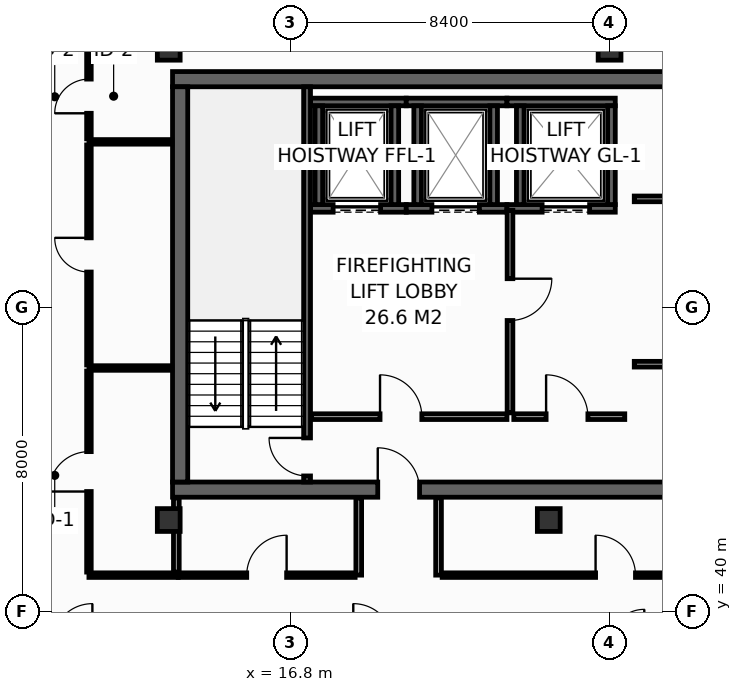
"""IFC4 building model, lengths in metres.
Left out: names, types, materials, properties, quantities, classifications, styles, units other than length and angle.
Written with IfcOpenShell. Run it as: python <this file> out.ifc"""

import sys

from ifc_helpers import new_model, si_unit, direction, frame, frame_2d, origin, origin_2d, place, context, subcontext, project, spatial, rectangle, hollow_rectangle, extrude, element, fill, save


model = new_model("IFC4")
c1 = context("Model", 3, precision=1e-05, world=origin(), true_north=direction((0.0, 1.0)))
c2 = subcontext(c1, "Body", "Model", "MODEL_VIEW")
j1 = project(units=[si_unit("LENGTHUNIT", "METRE"), si_unit("PLANEANGLEUNIT", "RADIAN")], contexts=[c1])
p1 = place(None, origin())
s1 = spatial("IfcSite", under=j1, at=p1, CompositionType="ELEMENT")
p2 = place(p1, origin())
s2 = spatial("IfcBuilding", under=s1, at=p2, CompositionType="ELEMENT")
p3 = place(p2, frame((0.0, 0.0, 283.8)))
s3 = spatial("IfcBuildingStorey", under=s2, at=p3, CompositionType="ELEMENT", Elevation=283.8)
p4 = place(p3, frame((13.7, 43.2, 0.0), z_axis=(0.0, 0.0, 1.0), x_axis=(1.0, 0.0, 0.0)))
e1 = element("IfcWall", 1, at=p4, inside=s3, PredefinedType="SHEAR", context=c2, shape_type="SweptSolid", body=[
    extrude(rectangle(XDim=32.5, YDim=0.4, at=frame_2d((16.25, 0.0))), origin(), (0.0, 0.0, 1.0), 3.55),
])
p5 = place(p4, frame((5.4, 0.0, 0.0)))
e2 = element("IfcOpeningElement", 2, at=p5, cuts=e1, PredefinedType="OPENING", context=c2, shape_type="SweptSolid", body=[
    extrude(rectangle(XDim=1.1, YDim=2.15, at=frame_2d((0.55, 1.075))), frame((0.0, 0.21, 0.0), z_axis=(0.0, -1.0, 0.0), x_axis=(1.0, 0.0, 0.0)), (0.0, 0.0, 1.0), 0.42),
])
p6 = place(p4, frame((25.6, 0.0, 0.0)))
e3 = element("IfcOpeningElement", 3, at=p6, cuts=e1, PredefinedType="OPENING", context=c2, shape_type="SweptSolid", body=[
    extrude(rectangle(XDim=1.1, YDim=2.15, at=frame_2d((0.55, 1.075))), frame((0.0, 0.21, 0.0), z_axis=(0.0, -1.0, 0.0), x_axis=(1.0, 0.0, 0.0)), (0.0, 0.0, 1.0), 0.42),
])
p7 = place(p3, frame((13.7, 54.0, 0.0), z_axis=(0.0, 0.0, 1.0), x_axis=(1.0, 0.0, 0.0)))
e4 = element("IfcWall", 4, at=p7, inside=s3, PredefinedType="SHEAR", context=c2, shape_type="SweptSolid", body=[
    extrude(rectangle(XDim=32.5, YDim=0.4, at=frame_2d((16.25, 0.0))), origin(), (0.0, 0.0, 1.0), 3.55),
])
p8 = place(p3, frame((13.9, 43.4, 0.0), z_axis=(0.0, 0.0, 1.0), x_axis=(0.0, 1.0, 0.0)))
e5 = element("IfcWall", 5, at=p8, inside=s3, PredefinedType="SHEAR", context=c2, shape_type="SweptSolid", body=[
    extrude(rectangle(XDim=10.4, YDim=0.4, at=frame_2d((5.2, 0.0))), origin(), (0.0, 0.0, 1.0), 3.55),
])
for number, where, z_axis, x_axis in (
    (6, (13.6, 54.8, 0.0), (0.0, 0.0, 1.0), (1.0, 0.0, 0.0)),
    (7, (25.2, 54.8, 0.0), (0.0, 0.0, 1.0), (1.0, 0.0, 0.0)),
    (8, (13.6, 42.4, 0.0), (0.0, 0.0, 1.0), (1.0, 0.0, 0.0)),
    (9, (23.6, 42.4, 0.0), (0.0, 0.0, 1.0), (1.0, 0.0, 0.0)),
):
    element("IfcColumn", number, at=place(p3, frame(where, z_axis=z_axis, x_axis=x_axis)), inside=s3, PredefinedType="COLUMN", context=c2, shape_type="SweptSolid", body=[
        extrude(hollow_rectangle(XDim=0.6, YDim=0.6, WallThickness=0.028, at=origin_2d()), origin(), (0.0, 0.0, 1.0), 3.8),
    ])
p9 = place(p3, frame((17.33, 50.6, 0.0), z_axis=(0.0, 0.0, 1.0), x_axis=(1.0, 0.0, 0.0)))
e10 = element("IfcWall", 10, at=p9, inside=s3, PredefinedType="SHEAR", context=c2, shape_type="SweptSolid", body=[
    extrude(rectangle(XDim=2.52, YDim=0.2, at=frame_2d((1.26, 0.0))), origin(), (0.0, 0.0, 1.0), 3.55),
])
p10 = place(p9, frame((0.595, 0.0, 0.0)))
e11 = element("IfcOpeningElement", 11, at=p10, cuts=e10, PredefinedType="OPENING", context=c2, shape_type="SweptSolid", body=[
    extrude(rectangle(XDim=1.25, YDim=2.3, at=frame_2d((0.625, 1.15))), frame((0.0, 0.11, 0.0), z_axis=(0.0, -1.0, 0.0), x_axis=(1.0, 0.0, 0.0)), (0.0, 0.0, 1.0), 0.22),
])
p11 = place(p3, frame((17.33, 53.4, 0.0), z_axis=(0.0, 0.0, 1.0), x_axis=(1.0, 0.0, 0.0)))
e12 = element("IfcWall", 12, at=p11, inside=s3, PredefinedType="SHEAR", context=c2, shape_type="SweptSolid", body=[
    extrude(rectangle(XDim=2.52, YDim=0.2, at=frame_2d((1.26, 0.0))), origin(), (0.0, 0.0, 1.0), 3.55),
])
for number, where, z_axis, x_axis in (
    (13, (17.55, 50.7, 0.0), (0.0, 0.0, 1.0), (0.0, 1.0, 0.0)),
    (14, (19.55, 50.7, 0.0), (0.0, 0.0, 1.0), (0.0, 1.0, 0.0)),
):
    element("IfcWall", number, at=place(p3, frame(where, z_axis=z_axis, x_axis=x_axis)), inside=s3, PredefinedType="SHEAR", context=c2, shape_type="SweptSolid", body=[
        extrude(rectangle(XDim=2.6, YDim=0.2, at=frame_2d((1.3, 0.0))), origin(), (0.0, 0.0, 1.0), 3.55),
    ])
p12 = place(p3, frame((19.85, 50.6, 0.0), z_axis=(0.0, 0.0, 1.0), x_axis=(1.0, 0.0, 0.0)))
e15 = element("IfcWall", 15, at=p12, inside=s3, PredefinedType="SHEAR", context=c2, shape_type="SweptSolid", body=[
    extrude(rectangle(XDim=2.65, YDim=0.2, at=frame_2d((1.325, 0.0))), origin(), (0.0, 0.0, 1.0), 3.55),
])
p13 = place(p12, frame((0.675, 0.0, 0.0)))
e16 = element("IfcOpeningElement", 16, at=p13, cuts=e15, PredefinedType="OPENING", context=c2, shape_type="SweptSolid", body=[
    extrude(rectangle(XDim=1.25, YDim=2.3, at=frame_2d((0.625, 1.15))), frame((0.0, 0.11, 0.0), z_axis=(0.0, -1.0, 0.0), x_axis=(1.0, 0.0, 0.0)), (0.0, 0.0, 1.0), 0.22),
])
p14 = place(p3, frame((19.85, 53.4, 0.0), z_axis=(0.0, 0.0, 1.0), x_axis=(1.0, 0.0, 0.0)))
e17 = element("IfcWall", 17, at=p14, inside=s3, PredefinedType="SHEAR", context=c2, shape_type="SweptSolid", body=[
    extrude(rectangle(XDim=2.65, YDim=0.2, at=frame_2d((1.325, 0.0))), origin(), (0.0, 0.0, 1.0), 3.55),
])
for number, where, z_axis, x_axis in (
    (18, (20.15, 50.7, 0.0), (0.0, 0.0, 1.0), (0.0, 1.0, 0.0)),
    (19, (22.15, 50.7, 0.0), (0.0, 0.0, 1.0), (0.0, 1.0, 0.0)),
):
    element("IfcWall", number, at=place(p3, frame(where, z_axis=z_axis, x_axis=x_axis)), inside=s3, PredefinedType="SHEAR", context=c2, shape_type="SweptSolid", body=[
        extrude(rectangle(XDim=2.6, YDim=0.2, at=frame_2d((1.3, 0.0))), origin(), (0.0, 0.0, 1.0), 3.55),
    ])
p15 = place(p3, frame((22.5, 50.6, 0.0), z_axis=(0.0, 0.0, 1.0), x_axis=(1.0, 0.0, 0.0)))
e20 = element("IfcWall", 20, at=p15, inside=s3, PredefinedType="SHEAR", context=c2, shape_type="SweptSolid", body=[
    extrude(rectangle(XDim=2.85, YDim=0.2, at=frame_2d((1.425, 0.0))), origin(), (0.0, 0.0, 1.0), 3.55),
])
p16 = place(p15, frame((0.925, 0.0, 0.0)))
e21 = element("IfcOpeningElement", 21, at=p16, cuts=e20, PredefinedType="OPENING", context=c2, shape_type="SweptSolid", body=[
    extrude(rectangle(XDim=1.25, YDim=2.3, at=frame_2d((0.625, 1.15))), frame((0.0, 0.11, 0.0), z_axis=(0.0, -1.0, 0.0), x_axis=(1.0, 0.0, 0.0)), (0.0, 0.0, 1.0), 0.22),
])
p17 = place(p3, frame((22.5, 53.4, 0.0), z_axis=(0.0, 0.0, 1.0), x_axis=(1.0, 0.0, 0.0)))
e22 = element("IfcWall", 22, at=p17, inside=s3, PredefinedType="SHEAR", context=c2, shape_type="SweptSolid", body=[
    extrude(rectangle(XDim=2.85, YDim=0.2, at=frame_2d((1.425, 0.0))), origin(), (0.0, 0.0, 1.0), 3.55),
])
for number, where, z_axis, x_axis in (
    (23, (22.85, 50.7, 0.0), (0.0, 0.0, 1.0), (0.0, 1.0, 0.0)),
    (24, (25.25, 50.7, 0.0), (0.0, 0.0, 1.0), (0.0, 1.0, 0.0)),
):
    element("IfcWall", number, at=place(p3, frame(where, z_axis=z_axis, x_axis=x_axis)), inside=s3, PredefinedType="SHEAR", context=c2, shape_type="SweptSolid", body=[
        extrude(rectangle(XDim=2.6, YDim=0.2, at=frame_2d((1.3, 0.0))), origin(), (0.0, 0.0, 1.0), 3.55),
    ])
p18 = place(p3, frame((17.24, 43.4, 0.0), z_axis=(0.0, 0.0, 1.0), x_axis=(0.0, 1.0, 0.0)))
e25 = element("IfcWall", 25, at=p18, inside=s3, PredefinedType="SHEAR", context=c2, shape_type="SweptSolid", body=[
    extrude(rectangle(XDim=10.4, YDim=0.18, at=frame_2d((5.2, 0.0))), origin(), (0.0, 0.0, 1.0), 3.55),
])
p19 = place(p18, frame((0.16, 0.0, 0.0)))
e26 = element("IfcOpeningElement", 26, at=p19, cuts=e25, PredefinedType="OPENING", context=c2, shape_type="SweptSolid", body=[
    extrude(rectangle(XDim=1.0, YDim=2.15, at=frame_2d((0.5, 1.075))), frame((0.0, 0.1, 0.0), z_axis=(0.0, -1.0, 0.0), x_axis=(1.0, 0.0, 0.0)), (0.0, 0.0, 1.0), 0.2),
])
p20 = place(p3, frame((17.36, 45.12, 0.0), z_axis=(0.0, 0.0, 1.0), x_axis=(1.0, 0.0, 0.0)))
e27 = element("IfcWall", 27, at=p20, inside=s3, PredefinedType="PARTITIONING", context=c2, shape_type="SweptSolid", body=[
    extrude(rectangle(XDim=5.14, YDim=0.15, at=frame_2d((2.57, 0.0))), origin(), (0.0, 0.0, 1.0), 3.55),
])
p21 = place(p20, frame((1.8, 0.0, 0.0)))
e28 = element("IfcOpeningElement", 28, at=p21, cuts=e27, PredefinedType="OPENING", context=c2, shape_type="SweptSolid", body=[
    extrude(rectangle(XDim=1.1, YDim=2.15, at=frame_2d((0.55, 1.075))), frame((0.0, 0.085, 0.0), z_axis=(0.0, -1.0, 0.0), x_axis=(1.0, 0.0, 0.0)), (0.0, 0.0, 1.0), 0.17),
])
p22 = place(p3, frame((22.58, 50.55, 0.0), z_axis=(0.0, 0.0, 1.0), x_axis=(0.0, -1.0, 0.0)))
e29 = element("IfcWall", 29, at=p22, inside=s3, PredefinedType="PARTITIONING", context=c2, shape_type="SweptSolid", body=[
    extrude(rectangle(XDim=5.33, YDim=0.15, at=frame_2d((2.665, 0.0))), origin(), (0.0, 0.0, 1.0), 3.55),
])
p23 = place(p22, frame((1.8, 0.0, 0.0)))
e30 = element("IfcOpeningElement", 30, at=p23, cuts=e29, PredefinedType="OPENING", context=c2, shape_type="SweptSolid", body=[
    extrude(rectangle(XDim=1.1, YDim=2.15, at=frame_2d((0.55, 1.075))), frame((0.0, 0.085, 0.0), z_axis=(0.0, -1.0, 0.0), x_axis=(1.0, 0.0, 0.0)), (0.0, 0.0, 1.0), 0.17),
])
p24 = place(p3, frame((22.68, 45.12, 0.0), z_axis=(0.0, 0.0, 1.0), x_axis=(1.0, 0.0, 0.0)))
e31 = element("IfcWall", 31, at=p24, inside=s3, PredefinedType="PARTITIONING", context=c2, shape_type="SweptSolid", body=[
    extrude(rectangle(XDim=2.92, YDim=0.15, at=frame_2d((1.46, 0.0))), origin(), (0.0, 0.0, 1.0), 3.55),
])
p25 = place(p24, frame((0.85, 0.0, 0.0)))
e32 = element("IfcOpeningElement", 32, at=p25, cuts=e31, PredefinedType="OPENING", context=c2, shape_type="SweptSolid", body=[
    extrude(rectangle(XDim=1.1, YDim=2.15, at=frame_2d((0.55, 1.075))), frame((0.0, 0.085, 0.0), z_axis=(0.0, -1.0, 0.0), x_axis=(1.0, 0.0, 0.0)), (0.0, 0.0, 1.0), 0.17),
])
p26 = place(p3, frame((25.85, 50.85, 0.0), z_axis=(0.0, 0.0, 1.0), x_axis=(1.0, 0.0, 0.0)))
e33 = element("IfcWall", 33, at=p26, inside=s3, PredefinedType="PARTITIONING", context=c2, shape_type="SweptSolid", body=[
    extrude(rectangle(XDim=7.65, YDim=0.15, at=frame_2d((3.825, 0.0))), origin(), (0.0, 0.0, 1.0), 3.55),
])
p27 = place(p26, frame((1.25, 0.0, 0.0)))
e34 = element("IfcOpeningElement", 34, at=p27, cuts=e33, PredefinedType="OPENING", context=c2, shape_type="SweptSolid", body=[
    extrude(rectangle(XDim=0.95, YDim=2.15, at=frame_2d((0.475, 1.075))), frame((0.0, 0.085, 0.0), z_axis=(0.0, -1.0, 0.0), x_axis=(1.0, 0.0, 0.0)), (0.0, 0.0, 1.0), 0.17),
])
p28 = place(p3, frame((25.85, 46.5, 0.0), z_axis=(0.0, 0.0, 1.0), x_axis=(1.0, 0.0, 0.0)))
e35 = element("IfcWall", 35, at=p28, inside=s3, PredefinedType="PARTITIONING", context=c2, shape_type="SweptSolid", body=[
    extrude(rectangle(XDim=7.65, YDim=0.15, at=frame_2d((3.825, 0.0))), origin(), (0.0, 0.0, 1.0), 3.55),
])
p29 = place(p28, frame((2.8, 0.0, 0.0)))
e36 = element("IfcOpeningElement", 36, at=p29, cuts=e35, PredefinedType="OPENING", context=c2, shape_type="SweptSolid", body=[
    extrude(rectangle(XDim=0.95, YDim=2.15, at=frame_2d((0.475, 1.075))), frame((0.0, 0.085, 0.0), z_axis=(0.0, -1.0, 0.0), x_axis=(1.0, 0.0, 0.0)), (0.0, 0.0, 1.0), 0.17),
])
p30 = place(p3, frame((11.5, 40.95, 0.0), z_axis=(0.0, 0.0, 1.0), x_axis=(1.0, 0.0, 0.0)))
e37 = element("IfcWall", 37, at=p30, inside=s3, PredefinedType="PARTITIONING", context=c2, shape_type="SweptSolid", body=[
    extrude(rectangle(XDim=2.35, YDim=0.12, at=frame_2d((1.175, 0.0))), origin(), (0.0, 0.0, 1.0), 3.55),
])
p31 = place(p3, frame((11.5, 52.35, 0.0), z_axis=(0.0, 0.0, 1.0), x_axis=(1.0, 0.0, 0.0)))
e38 = element("IfcWall", 38, at=p31, inside=s3, PredefinedType="PARTITIONING", context=c2, shape_type="SweptSolid", body=[
    extrude(rectangle(XDim=2.18, YDim=0.12, at=frame_2d((1.09, 0.0))), origin(), (0.0, 0.0, 1.0), 3.55),
])
p32 = place(p3, frame((11.5, 52.43, 0.0), z_axis=(0.0, 0.0, 1.0), x_axis=(0.0, 1.0, 0.0)))
e39 = element("IfcWall", 39, at=p32, inside=s3, PredefinedType="PARTITIONING", context=c2, shape_type="SweptSolid", body=[
    extrude(rectangle(XDim=3.565, YDim=0.12, at=frame_2d((1.783, 0.0))), origin(), (0.0, 0.0, 1.0), 2.935),
])
p33 = place(p32, frame((0.672, 0.0, 0.0)))
e40 = element("IfcOpeningElement", 40, at=p33, cuts=e39, PredefinedType="OPENING", context=c2, shape_type="SweptSolid", body=[
    extrude(rectangle(XDim=0.9, YDim=2.1, at=frame_2d((0.45, 1.05))), frame((0.0, 0.07, 0.0), z_axis=(0.0, -1.0, 0.0), x_axis=(1.0, 0.0, 0.0)), (0.0, 0.0, 1.0), 0.14),
])
p34 = place(p3, frame((11.5, 46.4, 0.0), z_axis=(0.0, 0.0, 1.0), x_axis=(1.0, 0.0, 0.0)))
e41 = element("IfcWall", 41, at=p34, inside=s3, PredefinedType="PARTITIONING", context=c2, shape_type="SweptSolid", body=[
    extrude(rectangle(XDim=2.18, YDim=0.12, at=frame_2d((1.09, 0.0))), origin(), (0.0, 0.0, 1.0), 3.55),
])
p35 = place(p3, frame((11.5, 41.03, 0.0), z_axis=(0.0, 0.0, 1.0), x_axis=(0.0, 1.0, 0.0)))
e42 = element("IfcWall", 42, at=p35, inside=s3, PredefinedType="PARTITIONING", context=c2, shape_type="SweptSolid", body=[
    extrude(rectangle(XDim=5.29, YDim=0.12, at=frame_2d((2.645, 0.0))), origin(), (0.0, 0.0, 1.0), 2.947),
])
p36 = place(p35, frame((2.12, 0.0, 0.0)))
e43 = element("IfcOpeningElement", 43, at=p36, cuts=e42, PredefinedType="OPENING", context=c2, shape_type="SweptSolid", body=[
    extrude(rectangle(XDim=1.05, YDim=2.15, at=frame_2d((0.525, 1.075))), frame((0.0, 0.07, 0.0), z_axis=(0.0, -1.0, 0.0), x_axis=(1.0, 0.0, 0.0)), (0.0, 0.0, 1.0), 0.14),
])
p37 = place(p3, frame((11.5, 46.48, 0.0), z_axis=(0.0, 0.0, 1.0), x_axis=(0.0, 1.0, 0.0)))
e44 = element("IfcWall", 44, at=p37, inside=s3, PredefinedType="PARTITIONING", context=c2, shape_type="SweptSolid", body=[
    extrude(rectangle(XDim=5.79, YDim=0.12, at=frame_2d((2.895, 0.0))), origin(), (0.0, 0.0, 1.0), 3.55),
])
p38 = place(p37, frame((2.445, 0.0, 0.0)))
e45 = element("IfcOpeningElement", 45, at=p38, cuts=e44, PredefinedType="OPENING", context=c2, shape_type="SweptSolid", body=[
    extrude(rectangle(XDim=0.9, YDim=2.1, at=frame_2d((0.45, 1.05))), frame((0.0, 0.07, 0.0), z_axis=(0.0, -1.0, 0.0), x_axis=(1.0, 0.0, 0.0)), (0.0, 0.0, 1.0), 0.14),
])
p39 = place(p3, frame((13.8, 41.03, 0.0), z_axis=(0.0, 0.0, 1.0), x_axis=(0.0, 1.0, 0.0)))
e46 = element("IfcWall", 46, at=p39, inside=s3, PredefinedType="PARTITIONING", context=c2, shape_type="SweptSolid", body=[
    extrude(rectangle(XDim=1.95, YDim=0.15, at=frame_2d((0.975, 0.0))), origin(), (0.0, 0.0, 1.0), 3.55),
])
for number, where, z_axis, x_axis in (
    (47, (18.6, 40.95, 0.0), (0.0, 0.0, 1.0), (0.0, 1.0, 0.0)),
    (48, (20.7, 40.95, 0.0), (0.0, 0.0, 1.0), (0.0, 1.0, 0.0)),
):
    element("IfcWall", number, at=place(p3, frame(where, z_axis=z_axis, x_axis=x_axis)), inside=s3, PredefinedType="PARTITIONING", context=c2, shape_type="SweptSolid", body=[
        extrude(rectangle(XDim=2.03, YDim=0.15, at=frame_2d((1.015, 0.0))), origin(), (0.0, 0.0, 1.0), 3.55),
    ])
p40 = place(p3, frame((13.85, 40.95, 0.0), z_axis=(0.0, 0.0, 1.0), x_axis=(1.0, 0.0, 0.0)))
e49 = element("IfcWall", 49, at=p40, inside=s3, PredefinedType="PARTITIONING", context=c2, shape_type="SweptSolid", body=[
    extrude(rectangle(XDim=4.655, YDim=0.12, at=frame_2d((2.327, 0.0))), origin(), (0.0, 0.0, 1.0), 3.55),
])
p41 = place(p40, frame((1.802, 0.0, 0.0)))
e50 = element("IfcOpeningElement", 50, at=p41, cuts=e49, PredefinedType="OPENING", context=c2, shape_type="SweptSolid", body=[
    extrude(rectangle(XDim=1.05, YDim=2.15, at=frame_2d((0.525, 1.075))), frame((0.0, 0.07, 0.0), z_axis=(0.0, -1.0, 0.0), x_axis=(1.0, 0.0, 0.0)), (0.0, 0.0, 1.0), 0.14),
])
p42 = place(p3, frame((20.795, 40.95, 0.0), z_axis=(0.0, 0.0, 1.0), x_axis=(1.0, 0.0, 0.0)))
e51 = element("IfcWall", 51, at=p42, inside=s3, PredefinedType="PARTITIONING", context=c2, shape_type="SweptSolid", body=[
    extrude(rectangle(XDim=9.125, YDim=0.12, at=frame_2d((4.562, 0.0))), origin(), (0.0, 0.0, 1.0), 3.047),
])
p43 = place(p42, frame((4.037, 0.0, 0.0)))
e52 = element("IfcOpeningElement", 52, at=p43, cuts=e51, PredefinedType="OPENING", context=c2, shape_type="SweptSolid", body=[
    extrude(rectangle(XDim=1.05, YDim=2.15, at=frame_2d((0.525, 1.075))), frame((0.0, 0.07, 0.0), z_axis=(0.0, -1.0, 0.0), x_axis=(1.0, 0.0, 0.0)), (0.0, 0.0, 1.0), 0.14),
])
p44 = place(p10, origin())
e53 = element("IfcDoor", 53, at=p44, inside=s3, OperationType="SLIDING_TO_LEFT", PredefinedType="DOOR", context=c2, shape_type="SweptSolid", body=[
    extrude(rectangle(XDim=1.25, YDim=2.3, at=frame_2d((0.625, 1.15))), frame((0.0, 0.025, 0.0), z_axis=(0.0, -1.0, 0.0), x_axis=(1.0, 0.0, 0.0)), (0.0, 0.0, 1.0), 0.05),
])
fill(e11, e53)
p45 = place(p13, origin())
e54 = element("IfcDoor", 54, at=p45, inside=s3, OperationType="SLIDING_TO_LEFT", PredefinedType="DOOR", context=c2, shape_type="SweptSolid", body=[
    extrude(rectangle(XDim=1.25, YDim=2.3, at=frame_2d((0.625, 1.15))), frame((0.0, 0.025, 0.0), z_axis=(0.0, -1.0, 0.0), x_axis=(1.0, 0.0, 0.0)), (0.0, 0.0, 1.0), 0.05),
])
fill(e16, e54)
p46 = place(p16, origin())
e55 = element("IfcDoor", 55, at=p46, inside=s3, OperationType="SLIDING_TO_LEFT", PredefinedType="DOOR", context=c2, shape_type="SweptSolid", body=[
    extrude(rectangle(XDim=1.25, YDim=2.3, at=frame_2d((0.625, 1.15))), frame((0.0, 0.025, 0.0), z_axis=(0.0, -1.0, 0.0), x_axis=(1.0, 0.0, 0.0)), (0.0, 0.0, 1.0), 0.05),
])
fill(e21, e55)
p47 = place(p19, origin())
e56 = element("IfcDoor", 56, at=p47, inside=s3, OperationType="SINGLE_SWING_RIGHT", PredefinedType="DOOR", context=c2, shape_type="SweptSolid", body=[
    extrude(rectangle(XDim=1.0, YDim=2.15, at=frame_2d((0.5, 1.075))), frame((0.0, 0.025, 0.0), z_axis=(0.0, -1.0, 0.0), x_axis=(1.0, 0.0, 0.0)), (0.0, 0.0, 1.0), 0.05),
])
fill(e26, e56)
p48 = place(p21, origin())
e57 = element("IfcDoor", 57, at=p48, inside=s3, OperationType="SINGLE_SWING_LEFT", PredefinedType="DOOR", context=c2, shape_type="SweptSolid", body=[
    extrude(rectangle(XDim=1.1, YDim=2.15, at=frame_2d((0.55, 1.075))), frame((0.0, 0.025, 0.0), z_axis=(0.0, -1.0, 0.0), x_axis=(1.0, 0.0, 0.0)), (0.0, 0.0, 1.0), 0.05),
])
fill(e28, e57)
p49 = place(p23, origin())
e58 = element("IfcDoor", 58, at=p49, inside=s3, OperationType="SINGLE_SWING_LEFT", PredefinedType="DOOR", context=c2, shape_type="SweptSolid", body=[
    extrude(rectangle(XDim=1.1, YDim=2.15, at=frame_2d((0.55, 1.075))), frame((0.0, 0.025, 0.0), z_axis=(0.0, -1.0, 0.0), x_axis=(1.0, 0.0, 0.0)), (0.0, 0.0, 1.0), 0.05),
])
fill(e30, e58)
p50 = place(p25, origin())
e59 = element("IfcDoor", 59, at=p50, inside=s3, OperationType="SINGLE_SWING_LEFT", PredefinedType="DOOR", context=c2, shape_type="SweptSolid", body=[
    extrude(rectangle(XDim=1.1, YDim=2.15, at=frame_2d((0.55, 1.075))), frame((0.0, 0.025, 0.0), z_axis=(0.0, -1.0, 0.0), x_axis=(1.0, 0.0, 0.0)), (0.0, 0.0, 1.0), 0.05),
])
fill(e32, e59)
p51 = place(p5, origin())
e60 = element("IfcDoor", 60, at=p51, inside=s3, OperationType="SINGLE_SWING_LEFT", PredefinedType="DOOR", context=c2, shape_type="SweptSolid", body=[
    extrude(rectangle(XDim=1.1, YDim=2.15, at=frame_2d((0.55, 1.075))), frame((0.0, 0.025, 0.0), z_axis=(0.0, -1.0, 0.0), x_axis=(1.0, 0.0, 0.0)), (0.0, 0.0, 1.0), 0.05),
])
fill(e2, e60)
p52 = place(p33, origin())
e61 = element("IfcDoor", 61, at=p52, inside=s3, OperationType="SINGLE_SWING_LEFT", PredefinedType="DOOR", context=c2, shape_type="SweptSolid", body=[
    extrude(rectangle(XDim=0.9, YDim=2.1, at=frame_2d((0.45, 1.05))), frame((0.0, 0.025, 0.0), z_axis=(0.0, -1.0, 0.0), x_axis=(1.0, 0.0, 0.0)), (0.0, 0.0, 1.0), 0.05),
])
fill(e40, e61)
p53 = place(p36, origin())
e62 = element("IfcDoor", 62, at=p53, inside=s3, OperationType="SINGLE_SWING_LEFT", PredefinedType="DOOR", context=c2, shape_type="SweptSolid", body=[
    extrude(rectangle(XDim=1.05, YDim=2.15, at=frame_2d((0.525, 1.075))), frame((0.0, 0.025, 0.0), z_axis=(0.0, -1.0, 0.0), x_axis=(1.0, 0.0, 0.0)), (0.0, 0.0, 1.0), 0.05),
])
fill(e43, e62)
p54 = place(p38, origin())
e63 = element("IfcDoor", 63, at=p54, inside=s3, OperationType="SINGLE_SWING_RIGHT", PredefinedType="DOOR", context=c2, shape_type="SweptSolid", body=[
    extrude(rectangle(XDim=0.9, YDim=2.1, at=frame_2d((0.45, 1.05))), frame((0.0, 0.025, 0.0), z_axis=(0.0, -1.0, 0.0), x_axis=(1.0, 0.0, 0.0)), (0.0, 0.0, 1.0), 0.05),
])
fill(e45, e63)
p55 = place(p41, origin())
e64 = element("IfcDoor", 64, at=p55, inside=s3, OperationType="SINGLE_SWING_RIGHT", PredefinedType="DOOR", context=c2, shape_type="SweptSolid", body=[
    extrude(rectangle(XDim=1.05, YDim=2.15, at=frame_2d((0.525, 1.075))), frame((0.0, 0.025, 0.0), z_axis=(0.0, -1.0, 0.0), x_axis=(1.0, 0.0, 0.0)), (0.0, 0.0, 1.0), 0.05),
])
fill(e50, e64)
p56 = place(p43, origin())
e65 = element("IfcDoor", 65, at=p56, inside=s3, OperationType="SINGLE_SWING_LEFT", PredefinedType="DOOR", context=c2, shape_type="SweptSolid", body=[
    extrude(rectangle(XDim=1.05, YDim=2.15, at=frame_2d((0.525, 1.075))), frame((0.0, 0.025, 0.0), z_axis=(0.0, -1.0, 0.0), x_axis=(1.0, 0.0, 0.0)), (0.0, 0.0, 1.0), 0.05),
])
fill(e52, e65)
save(model, sys.argv[1])
